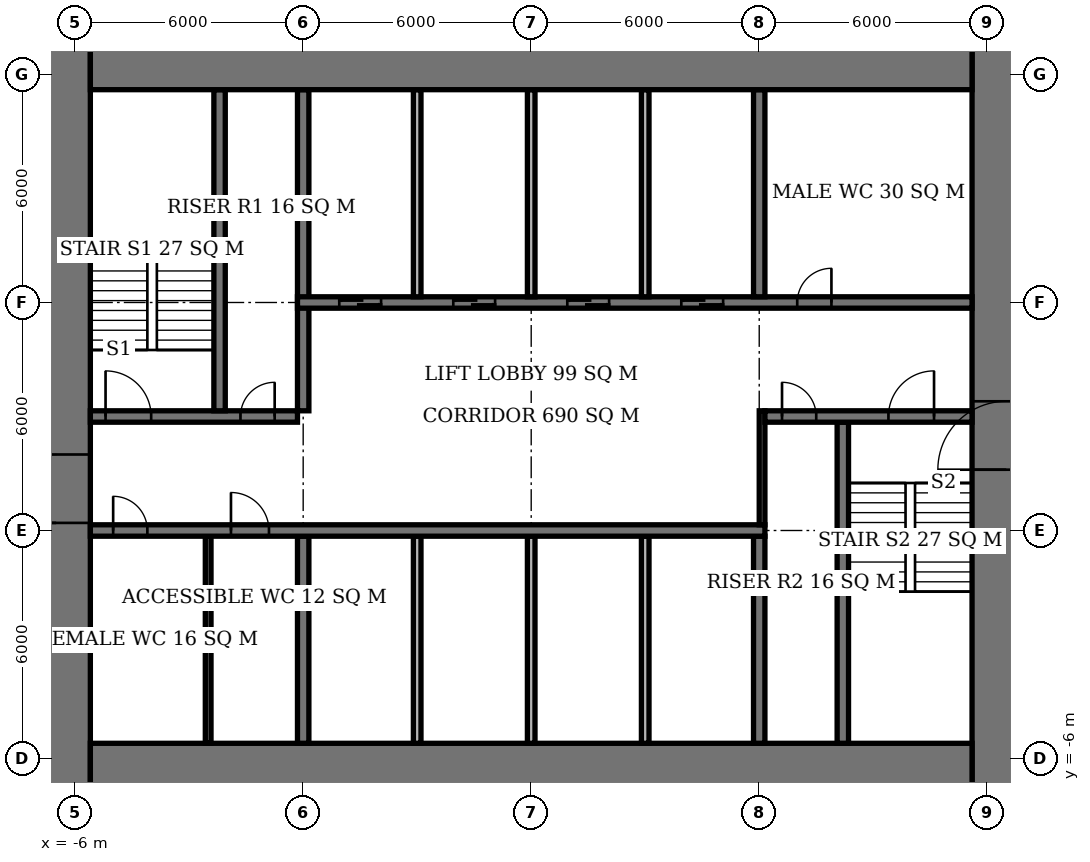
"""IFC4 building model, lengths in metres.
Left out: names, types, materials, properties, quantities, classifications, styles, units other than length and angle.
Written with IfcOpenShell. Run it as: python <this file> out.ifc"""

import sys

from ifc_helpers import new_model, si_unit, direction, frame, frame_2d, origin, place, context, subcontext, project, spatial, rectangle, extrude, element, fill, save


model = new_model("IFC4")
c1 = context("Model", 3, precision=1e-05, world=origin(), true_north=direction((0.0, 1.0)))
c2 = subcontext(c1, "Body", "Model", "MODEL_VIEW")
j1 = project(units=[si_unit("LENGTHUNIT", "METRE"), si_unit("PLANEANGLEUNIT", "RADIAN")], contexts=[c1])
p1 = place(None, origin())
s1 = spatial("IfcSite", under=j1, at=p1, CompositionType="ELEMENT")
p2 = place(p1, origin())
s2 = spatial("IfcBuilding", under=s1, at=p2, CompositionType="ELEMENT")
p3 = place(p2, frame((0.0, 0.0, 45.5)))
s3 = spatial("IfcBuildingStorey", under=s2, at=p3, CompositionType="ELEMENT", Elevation=45.5)
for number, where, z_axis, x_axis in (
    (1, (-5.6, -6.6, 0.0), (0.0, 0.0, 1.0), (1.0, 0.0, 0.0)),
    (2, (-5.6, 12.6, 0.0), (0.0, 0.0, 1.0), (1.0, 0.0, 0.0)),
):
    element("IfcWall", number, at=place(p3, frame(where, z_axis=z_axis, x_axis=x_axis)), inside=s3, PredefinedType="SHEAR", context=c2, shape_type="SweptSolid", body=[
        extrude(rectangle(XDim=23.2, YDim=2.0, at=frame_2d((11.6, 0.0))), origin(), (0.0, 0.0, 1.0), 3.9),
    ])
p4 = place(p3, frame((-6.5, -7.6, 0.0), z_axis=(0.0, 0.0, 1.0), x_axis=(0.0, 1.0, 0.0)))
e3 = element("IfcWall", 3, at=p4, inside=s3, PredefinedType="SHEAR", context=c2, shape_type="SweptSolid", body=[
    extrude(rectangle(XDim=21.2, YDim=1.8, at=frame_2d((10.6, 0.0))), origin(), (0.0, 0.0, 1.0), 3.9),
])
p5 = place(p4, frame((7.8, 0.0, 0.0)))
e4 = element("IfcOpeningElement", 4, at=p5, cuts=e3, PredefinedType="OPENING", context=c2, shape_type="SweptSolid", body=[
    extrude(rectangle(XDim=1.8, YDim=2.4, at=frame_2d((0.9, 1.2))), frame((0.0, 0.91, 0.0), z_axis=(0.0, -1.0, 0.0), x_axis=(1.0, 0.0, 0.0)), (0.0, 0.0, 1.0), 1.82),
])
p6 = place(p3, frame((18.5, -7.6, 0.0), z_axis=(0.0, 0.0, 1.0), x_axis=(0.0, 1.0, 0.0)))
e5 = element("IfcWall", 5, at=p6, inside=s3, PredefinedType="SHEAR", context=c2, shape_type="SweptSolid", body=[
    extrude(rectangle(XDim=21.2, YDim=1.8, at=frame_2d((10.6, 0.0))), origin(), (0.0, 0.0, 1.0), 3.9),
])
p7 = place(p6, frame((9.2, 0.0, 0.0)))
e6 = element("IfcOpeningElement", 6, at=p7, cuts=e5, PredefinedType="OPENING", context=c2, shape_type="SweptSolid", body=[
    extrude(rectangle(XDim=1.8, YDim=2.4, at=frame_2d((0.9, 1.2))), frame((0.0, 0.91, 0.0), z_axis=(0.0, -1.0, 0.0), x_axis=(1.0, 0.0, 0.0)), (0.0, 0.0, 1.0), 1.82),
])
p8 = place(p3, frame((-5.6, 0.0, 0.0), z_axis=(0.0, 0.0, 1.0), x_axis=(1.0, 0.0, 0.0)))
e7 = element("IfcWall", 7, at=p8, inside=s3, PredefinedType="SHEAR", context=c2, shape_type="SweptSolid", body=[
    extrude(rectangle(XDim=17.75, YDim=0.3, at=frame_2d((8.875, 0.0))), origin(), (0.0, 0.0, 1.0), 3.9),
])
p9 = place(p8, frame((0.6, 0.0, 0.0)))
e8 = element("IfcOpeningElement", 8, at=p9, cuts=e7, PredefinedType="OPENING", context=c2, shape_type="SweptSolid", body=[
    extrude(rectangle(XDim=0.9, YDim=2.1, at=frame_2d((0.45, 1.05))), frame((0.0, 0.16, 0.0), z_axis=(0.0, -1.0, 0.0), x_axis=(1.0, 0.0, 0.0)), (0.0, 0.0, 1.0), 0.32),
])
p10 = place(p8, frame((3.7, 0.0, 0.0)))
e9 = element("IfcOpeningElement", 9, at=p10, cuts=e7, PredefinedType="OPENING", context=c2, shape_type="SweptSolid", body=[
    extrude(rectangle(XDim=1.0, YDim=2.1, at=frame_2d((0.5, 1.05))), frame((0.0, 0.16, 0.0), z_axis=(0.0, -1.0, 0.0), x_axis=(1.0, 0.0, 0.0)), (0.0, 0.0, 1.0), 0.32),
])
p11 = place(p3, frame((-5.6, 3.0, 0.0), z_axis=(0.0, 0.0, 1.0), x_axis=(1.0, 0.0, 0.0)))
e10 = element("IfcWall", 10, at=p11, inside=s3, PredefinedType="SHEAR", context=c2, shape_type="SweptSolid", body=[
    extrude(rectangle(XDim=5.45, YDim=0.3, at=frame_2d((2.725, 0.0))), origin(), (0.0, 0.0, 1.0), 3.9),
])
p12 = place(p11, frame((0.4, 0.0, 0.0)))
e11 = element("IfcOpeningElement", 11, at=p12, cuts=e10, PredefinedType="OPENING", context=c2, shape_type="SweptSolid", body=[
    extrude(rectangle(XDim=1.2, YDim=2.1, at=frame_2d((0.6, 1.05))), frame((0.0, 0.16, 0.0), z_axis=(0.0, -1.0, 0.0), x_axis=(1.0, 0.0, 0.0)), (0.0, 0.0, 1.0), 0.32),
])
p13 = place(p11, frame((3.95, 0.0, 0.0)))
e12 = element("IfcOpeningElement", 12, at=p13, cuts=e10, PredefinedType="OPENING", context=c2, shape_type="SweptSolid", body=[
    extrude(rectangle(XDim=0.9, YDim=2.1, at=frame_2d((0.45, 1.05))), frame((0.0, 0.16, 0.0), z_axis=(0.0, -1.0, 0.0), x_axis=(1.0, 0.0, 0.0)), (0.0, 0.0, 1.0), 0.32),
])
p14 = place(p3, frame((12.15, 3.0, 0.0), z_axis=(0.0, 0.0, 1.0), x_axis=(1.0, 0.0, 0.0)))
e13 = element("IfcWall", 13, at=p14, inside=s3, PredefinedType="SHEAR", context=c2, shape_type="SweptSolid", body=[
    extrude(rectangle(XDim=5.45, YDim=0.3, at=frame_2d((2.725, 0.0))), origin(), (0.0, 0.0, 1.0), 3.9),
])
p15 = place(p14, frame((3.25, 0.0, 0.0)))
e14 = element("IfcOpeningElement", 14, at=p15, cuts=e13, PredefinedType="OPENING", context=c2, shape_type="SweptSolid", body=[
    extrude(rectangle(XDim=1.2, YDim=2.1, at=frame_2d((0.6, 1.05))), frame((0.0, 0.16, 0.0), z_axis=(0.0, -1.0, 0.0), x_axis=(1.0, 0.0, 0.0)), (0.0, 0.0, 1.0), 0.32),
])
p16 = place(p14, frame((0.45, 0.0, 0.0)))
e15 = element("IfcOpeningElement", 15, at=p16, cuts=e13, PredefinedType="OPENING", context=c2, shape_type="SweptSolid", body=[
    extrude(rectangle(XDim=0.9, YDim=2.1, at=frame_2d((0.45, 1.05))), frame((0.0, 0.16, 0.0), z_axis=(0.0, -1.0, 0.0), x_axis=(1.0, 0.0, 0.0)), (0.0, 0.0, 1.0), 0.32),
])
p17 = place(p3, frame((-0.15, 6.0, 0.0), z_axis=(0.0, 0.0, 1.0), x_axis=(1.0, 0.0, 0.0)))
e16 = element("IfcWall", 16, at=p17, inside=s3, PredefinedType="SHEAR", context=c2, shape_type="SweptSolid", body=[
    extrude(rectangle(XDim=17.75, YDim=0.3, at=frame_2d((8.875, 0.0))), origin(), (0.0, 0.0, 1.0), 3.9),
])
p18 = place(p17, frame((13.15, 0.0, 0.0)))
e17 = element("IfcOpeningElement", 17, at=p18, cuts=e16, PredefinedType="OPENING", context=c2, shape_type="SweptSolid", body=[
    extrude(rectangle(XDim=0.9, YDim=2.1, at=frame_2d((0.45, 1.05))), frame((0.0, 0.16, 0.0), z_axis=(0.0, -1.0, 0.0), x_axis=(1.0, 0.0, 0.0)), (0.0, 0.0, 1.0), 0.32),
])
p19 = place(p17, frame((1.1, 0.0, 0.0)))
e18 = element("IfcOpeningElement", 18, at=p19, cuts=e16, PredefinedType="OPENING", context=c2, shape_type="SweptSolid", body=[
    extrude(rectangle(XDim=1.1, YDim=2.1, at=frame_2d((0.55, 1.05))), frame((0.0, 0.16, 0.0), z_axis=(0.0, -1.0, 0.0), x_axis=(1.0, 0.0, 0.0)), (0.0, 0.0, 1.0), 0.32),
])
p20 = place(p17, frame((4.1, 0.0, 0.0)))
e19 = element("IfcOpeningElement", 19, at=p20, cuts=e16, PredefinedType="OPENING", context=c2, shape_type="SweptSolid", body=[
    extrude(rectangle(XDim=1.1, YDim=2.1, at=frame_2d((0.55, 1.05))), frame((0.0, 0.16, 0.0), z_axis=(0.0, -1.0, 0.0), x_axis=(1.0, 0.0, 0.0)), (0.0, 0.0, 1.0), 0.32),
])
p21 = place(p17, frame((7.1, 0.0, 0.0)))
e20 = element("IfcOpeningElement", 20, at=p21, cuts=e16, PredefinedType="OPENING", context=c2, shape_type="SweptSolid", body=[
    extrude(rectangle(XDim=1.1, YDim=2.1, at=frame_2d((0.55, 1.05))), frame((0.0, 0.16, 0.0), z_axis=(0.0, -1.0, 0.0), x_axis=(1.0, 0.0, 0.0)), (0.0, 0.0, 1.0), 0.32),
])
p22 = place(p17, frame((10.1, 0.0, 0.0)))
e21 = element("IfcOpeningElement", 21, at=p22, cuts=e16, PredefinedType="OPENING", context=c2, shape_type="SweptSolid", body=[
    extrude(rectangle(XDim=1.1, YDim=2.1, at=frame_2d((0.55, 1.05))), frame((0.0, 0.16, 0.0), z_axis=(0.0, -1.0, 0.0), x_axis=(1.0, 0.0, 0.0)), (0.0, 0.0, 1.0), 0.32),
])
p23 = place(p3, frame((0.0, -5.6, 0.0), z_axis=(0.0, 0.0, 1.0), x_axis=(0.0, 1.0, 0.0)))
e22 = element("IfcWall", 22, at=p23, inside=s3, PredefinedType="SHEAR", context=c2, shape_type="SweptSolid", body=[
    extrude(rectangle(XDim=5.45, YDim=0.3, at=frame_2d((2.725, 0.0))), origin(), (0.0, 0.0, 1.0), 3.9),
])
p24 = place(p3, frame((0.0, 3.15, 0.0), z_axis=(0.0, 0.0, 1.0), x_axis=(0.0, 1.0, 0.0)))
e23 = element("IfcWall", 23, at=p24, inside=s3, PredefinedType="SHEAR", context=c2, shape_type="SweptSolid", body=[
    extrude(rectangle(XDim=8.45, YDim=0.3, at=frame_2d((4.225, 0.0))), origin(), (0.0, 0.0, 1.0), 3.9),
])
for number, where, z_axis, x_axis in (
    (24, (12.0, -5.6, 0.0), (0.0, 0.0, 1.0), (0.0, 1.0, 0.0)),
    (25, (12.0, 6.15, 0.0), (0.0, 0.0, 1.0), (0.0, 1.0, 0.0)),
):
    element("IfcWall", number, at=place(p3, frame(where, z_axis=z_axis, x_axis=x_axis)), inside=s3, PredefinedType="SHEAR", context=c2, shape_type="SweptSolid", body=[
        extrude(rectangle(XDim=5.45, YDim=0.3, at=frame_2d((2.725, 0.0))), origin(), (0.0, 0.0, 1.0), 3.9),
    ])
for number, where, z_axis, x_axis in (
    (26, (-2.2, 3.15, 0.0), (0.0, 0.0, 1.0), (0.0, 1.0, 0.0)),
    (27, (14.2, -5.6, 0.0), (0.0, 0.0, 1.0), (0.0, 1.0, 0.0)),
):
    element("IfcWall", number, at=place(p3, frame(where, z_axis=z_axis, x_axis=x_axis)), inside=s3, PredefinedType="SHEAR", context=c2, shape_type="SweptSolid", body=[
        extrude(rectangle(XDim=8.45, YDim=0.3, at=frame_2d((4.225, 0.0))), origin(), (0.0, 0.0, 1.0), 3.9),
    ])
for number, where, z_axis, x_axis in (
    (28, (3.0, 6.15, 0.0), (0.0, 0.0, 1.0), (0.0, 1.0, 0.0)),
    (29, (6.0, 6.15, 0.0), (0.0, 0.0, 1.0), (0.0, 1.0, 0.0)),
    (30, (9.0, 6.15, 0.0), (0.0, 0.0, 1.0), (0.0, 1.0, 0.0)),
    (31, (3.0, -5.6, 0.0), (0.0, 0.0, 1.0), (0.0, 1.0, 0.0)),
    (32, (6.0, -5.6, 0.0), (0.0, 0.0, 1.0), (0.0, 1.0, 0.0)),
    (33, (9.0, -5.6, 0.0), (0.0, 0.0, 1.0), (0.0, 1.0, 0.0)),
):
    element("IfcWall", number, at=place(p3, frame(where, z_axis=z_axis, x_axis=x_axis)), inside=s3, PredefinedType="SOLIDWALL", context=c2, shape_type="SweptSolid", body=[
        extrude(rectangle(XDim=5.45, YDim=0.2, at=frame_2d((2.725, 0.0))), origin(), (0.0, 0.0, 1.0), 3.9),
    ])
p25 = place(p3, frame((-2.5, -5.6, 0.0), z_axis=(0.0, 0.0, 1.0), x_axis=(0.0, 1.0, 0.0)))
e34 = element("IfcWall", 34, at=p25, inside=s3, PredefinedType="PLUMBINGWALL", context=c2, shape_type="SweptSolid", body=[
    extrude(rectangle(XDim=5.45, YDim=0.15, at=frame_2d((2.725, 0.0))), origin(), (0.0, 0.0, 1.0), 3.65),
])
p26 = place(p3, frame((12.075, 0.15, 0.0), z_axis=(0.0, 0.0, 1.0), x_axis=(0.0, 1.0, 0.0)))
e35 = element("IfcWall", 35, at=p26, inside=s3, PredefinedType="PARTITIONING", context=c2, shape_type="SweptSolid", body=[
    extrude(rectangle(XDim=3.0, YDim=0.15, at=frame_2d((1.5, 0.0))), origin(), (0.0, 0.0, 1.0), 3.65),
])
p27 = place(p5, origin())
e36 = element("IfcDoor", 36, at=p27, inside=s3, OperationType="DOUBLE_DOOR_SINGLE_SWING", PredefinedType="DOOR", context=c2, shape_type="SweptSolid", body=[
    extrude(rectangle(XDim=1.8, YDim=2.4, at=frame_2d((0.9, 1.2))), frame((0.0, 0.025, 0.0), z_axis=(0.0, -1.0, 0.0), x_axis=(1.0, 0.0, 0.0)), (0.0, 0.0, 1.0), 0.05),
])
fill(e4, e36)
p28 = place(p7, origin())
e37 = element("IfcDoor", 37, at=p28, inside=s3, OperationType="DOUBLE_DOOR_SINGLE_SWING", PredefinedType="DOOR", context=c2, shape_type="SweptSolid", body=[
    extrude(rectangle(XDim=1.8, YDim=2.4, at=frame_2d((0.9, 1.2))), frame((0.0, 0.025, 0.0), z_axis=(0.0, -1.0, 0.0), x_axis=(1.0, 0.0, 0.0)), (0.0, 0.0, 1.0), 0.05),
])
fill(e6, e37)
p29 = place(p12, origin())
e38 = element("IfcDoor", 38, at=p29, inside=s3, OperationType="SINGLE_SWING_LEFT", PredefinedType="DOOR", context=c2, shape_type="SweptSolid", body=[
    extrude(rectangle(XDim=1.2, YDim=2.1, at=frame_2d((0.6, 1.05))), frame((0.0, 0.025, 0.0), z_axis=(0.0, -1.0, 0.0), x_axis=(1.0, 0.0, 0.0)), (0.0, 0.0, 1.0), 0.05),
])
fill(e11, e38)
p30 = place(p13, origin())
e39 = element("IfcDoor", 39, at=p30, inside=s3, OperationType="SINGLE_SWING_RIGHT", PredefinedType="DOOR", context=c2, shape_type="SweptSolid", body=[
    extrude(rectangle(XDim=0.9, YDim=2.1, at=frame_2d((0.45, 1.05))), frame((0.0, 0.025, 0.0), z_axis=(0.0, -1.0, 0.0), x_axis=(1.0, 0.0, 0.0)), (0.0, 0.0, 1.0), 0.05),
])
fill(e12, e39)
p31 = place(p15, origin())
e40 = element("IfcDoor", 40, at=p31, inside=s3, OperationType="SINGLE_SWING_RIGHT", PredefinedType="DOOR", context=c2, shape_type="SweptSolid", body=[
    extrude(rectangle(XDim=1.2, YDim=2.1, at=frame_2d((0.6, 1.05))), frame((0.0, 0.025, 0.0), z_axis=(0.0, -1.0, 0.0), x_axis=(1.0, 0.0, 0.0)), (0.0, 0.0, 1.0), 0.05),
])
fill(e14, e40)
p32 = place(p16, origin())
e41 = element("IfcDoor", 41, at=p32, inside=s3, OperationType="SINGLE_SWING_LEFT", PredefinedType="DOOR", context=c2, shape_type="SweptSolid", body=[
    extrude(rectangle(XDim=0.9, YDim=2.1, at=frame_2d((0.45, 1.05))), frame((0.0, 0.025, 0.0), z_axis=(0.0, -1.0, 0.0), x_axis=(1.0, 0.0, 0.0)), (0.0, 0.0, 1.0), 0.05),
])
fill(e15, e41)
p33 = place(p9, origin())
e42 = element("IfcDoor", 42, at=p33, inside=s3, OperationType="SINGLE_SWING_LEFT", PredefinedType="DOOR", context=c2, shape_type="SweptSolid", body=[
    extrude(rectangle(XDim=0.9, YDim=2.1, at=frame_2d((0.45, 1.05))), frame((0.0, 0.025, 0.0), z_axis=(0.0, -1.0, 0.0), x_axis=(1.0, 0.0, 0.0)), (0.0, 0.0, 1.0), 0.05),
])
fill(e8, e42)
p34 = place(p10, origin())
e43 = element("IfcDoor", 43, at=p34, inside=s3, OperationType="SINGLE_SWING_LEFT", PredefinedType="DOOR", context=c2, shape_type="SweptSolid", body=[
    extrude(rectangle(XDim=1.0, YDim=2.1, at=frame_2d((0.5, 1.05))), frame((0.0, 0.025, 0.0), z_axis=(0.0, -1.0, 0.0), x_axis=(1.0, 0.0, 0.0)), (0.0, 0.0, 1.0), 0.05),
])
fill(e9, e43)
p35 = place(p18, origin())
e44 = element("IfcDoor", 44, at=p35, inside=s3, OperationType="SINGLE_SWING_RIGHT", PredefinedType="DOOR", context=c2, shape_type="SweptSolid", body=[
    extrude(rectangle(XDim=0.9, YDim=2.1, at=frame_2d((0.45, 1.05))), frame((0.0, 0.025, 0.0), z_axis=(0.0, -1.0, 0.0), x_axis=(1.0, 0.0, 0.0)), (0.0, 0.0, 1.0), 0.05),
])
fill(e17, e44)
p36 = place(p19, origin())
e45 = element("IfcDoor", 45, at=p36, inside=s3, OperationType="DOUBLE_DOOR_SLIDING", PredefinedType="USERDEFINED", context=c2, shape_type="SweptSolid", body=[
    extrude(rectangle(XDim=1.1, YDim=2.1, at=frame_2d((0.55, 1.05))), frame((0.0, 0.025, 0.0), z_axis=(0.0, -1.0, 0.0), x_axis=(1.0, 0.0, 0.0)), (0.0, 0.0, 1.0), 0.05),
])
fill(e18, e45)
p37 = place(p20, origin())
e46 = element("IfcDoor", 46, at=p37, inside=s3, OperationType="DOUBLE_DOOR_SLIDING", PredefinedType="USERDEFINED", context=c2, shape_type="SweptSolid", body=[
    extrude(rectangle(XDim=1.1, YDim=2.1, at=frame_2d((0.55, 1.05))), frame((0.0, 0.025, 0.0), z_axis=(0.0, -1.0, 0.0), x_axis=(1.0, 0.0, 0.0)), (0.0, 0.0, 1.0), 0.05),
])
fill(e19, e46)
p38 = place(p21, origin())
e47 = element("IfcDoor", 47, at=p38, inside=s3, OperationType="DOUBLE_DOOR_SLIDING", PredefinedType="USERDEFINED", context=c2, shape_type="SweptSolid", body=[
    extrude(rectangle(XDim=1.1, YDim=2.1, at=frame_2d((0.55, 1.05))), frame((0.0, 0.025, 0.0), z_axis=(0.0, -1.0, 0.0), x_axis=(1.0, 0.0, 0.0)), (0.0, 0.0, 1.0), 0.05),
])
fill(e20, e47)
p39 = place(p22, origin())
e48 = element("IfcDoor", 48, at=p39, inside=s3, OperationType="DOUBLE_DOOR_SLIDING", PredefinedType="USERDEFINED", context=c2, shape_type="SweptSolid", body=[
    extrude(rectangle(XDim=1.1, YDim=2.1, at=frame_2d((0.55, 1.05))), frame((0.0, 0.025, 0.0), z_axis=(0.0, -1.0, 0.0), x_axis=(1.0, 0.0, 0.0)), (0.0, 0.0, 1.0), 0.05),
])
fill(e21, e48)
save(model, sys.argv[1])
